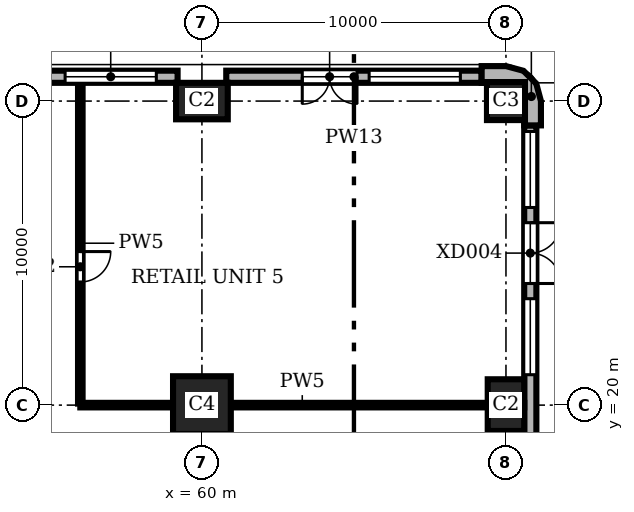
"""IFC4 building model, lengths in metres.
Left out: names, types, materials, properties, quantities, classifications, styles, units other than length and angle.
Written with IfcOpenShell. Run it as: python <this file> out.ifc"""

import sys

from ifc_helpers import new_model, si_unit, direction, frame, frame_2d, origin, origin_2d, place, context, subcontext, project, spatial, polyline, rectangle, outline, extrude, element, fill, save


model = new_model("IFC4")
c1 = context("Model", 3, precision=1e-05, world=origin(), true_north=direction((0.0, 1.0)))
c2 = subcontext(c1, "Body", "Model", "MODEL_VIEW")
j1 = project(units=[si_unit("LENGTHUNIT", "METRE"), si_unit("PLANEANGLEUNIT", "RADIAN")], contexts=[c1])
p1 = place(None, origin())
s1 = spatial("IfcSite", under=j1, at=p1, CompositionType="ELEMENT")
p2 = place(p1, origin())
s2 = spatial("IfcBuilding", under=s1, at=p2, CompositionType="ELEMENT")
p3 = place(p2, origin())
s3 = spatial("IfcBuildingStorey", under=s2, at=p3, CompositionType="ELEMENT", Elevation=0.0)
p4 = place(p3, frame((70.0, 20.0, 0.0), z_axis=(0.0, 0.0, 1.0), x_axis=(0.0, 1.0, 0.0)))
e1 = element("IfcColumn", 1, at=p4, inside=s3, PredefinedType="COLUMN", context=c2, shape_type="SweptSolid", body=[
    extrude(rectangle(XDim=1.7, YDim=1.2, at=origin_2d()), origin(), (0.0, 0.0, 1.0), 6.0),
])
p5 = place(p3, frame((70.0, 30.0, 0.0), z_axis=(0.0, 0.0, 1.0), x_axis=(1.0, 0.0, 0.0)))
e2 = element("IfcColumn", 2, at=p5, inside=s3, PredefinedType="COLUMN", context=c2, shape_type="SweptSolid", body=[
    extrude(rectangle(XDim=1.25, YDim=1.25, at=origin_2d()), origin(), (0.0, 0.0, 1.0), 6.0),
])
p6 = place(p3, frame((60.0, 30.0, 0.0), z_axis=(0.0, 0.0, 1.0), x_axis=(1.0, 0.0, 0.0)))
e3 = element("IfcColumn", 3, at=p6, inside=s3, PredefinedType="COLUMN", context=c2, shape_type="SweptSolid", body=[
    extrude(rectangle(XDim=1.7, YDim=1.2, at=origin_2d()), origin(), (0.0, 0.0, 1.0), 6.0),
])
p7 = place(p3, frame((60.0, 20.0, 0.0), z_axis=(0.0, 0.0, 1.0), x_axis=(1.0, 0.0, 0.0)))
e4 = element("IfcColumn", 4, at=p7, inside=s3, PredefinedType="COLUMN", context=c2, shape_type="SweptSolid", body=[
    extrude(rectangle(XDim=1.9, YDim=1.9, at=origin_2d()), origin(), (0.0, 0.0, 1.0), 6.0),
])
p8 = place(p3, origin())
e5 = element("IfcWall", 5, at=p8, inside=s3, PredefinedType="SOLIDWALL", context=c2, shape_type="SweptSolid", body=[
    extrude(outline(polyline([(71.0, 29.2), (71.15, 29.2), (71.15, 30.0), (70.996, 30.575), (70.575, 30.996), (70.0, 31.15), (69.2, 31.15), (69.2, 31.0), (69.2, 30.6), (70.0, 30.6), (70.3, 30.52), (70.52, 30.3), (70.6, 30.0), (70.6, 29.2), (71.0, 29.2)])), origin(), (0.0, 0.0, 1.0), 6.0),
])
p9 = place(p3, frame((70.8, 0.8, 0.0), z_axis=(0.0, 0.0, 1.0), x_axis=(0.0, 1.0, 0.0)))
e6 = element("IfcWall", 6, at=p9, inside=s3, PredefinedType="SOLIDWALL", context=c2, shape_type="SweptSolid", body=[
    extrude(rectangle(XDim=28.4, YDim=0.4, at=frame_2d((14.2, 0.0))), origin(), (0.0, 0.0, 1.0), 6.0),
])
p10 = place(p9, frame((0.2, 0.0, 0.3)))
e7 = element("IfcOpeningElement", 7, at=p10, cuts=e6, PredefinedType="OPENING", context=c2, shape_type="SweptSolid", body=[
    extrude(rectangle(XDim=2.5, YDim=4.2, at=frame_2d((1.25, 2.1))), frame((0.0, 0.21, 0.0), z_axis=(0.0, -1.0, 0.0), x_axis=(1.0, 0.0, 0.0)), (0.0, 0.0, 1.0), 0.42),
])
p11 = place(p9, frame((3.2, 0.0, 0.0)))
e8 = element("IfcOpeningElement", 8, at=p11, cuts=e6, PredefinedType="OPENING", context=c2, shape_type="SweptSolid", body=[
    extrude(rectangle(XDim=2.0, YDim=2.7, at=frame_2d((1.0, 1.35))), frame((0.0, 0.21, 0.0), z_axis=(0.0, -1.0, 0.0), x_axis=(1.0, 0.0, 0.0)), (0.0, 0.0, 1.0), 0.42),
])
p12 = place(p9, frame((5.7, 0.0, 0.3)))
e9 = element("IfcOpeningElement", 9, at=p12, cuts=e6, PredefinedType="OPENING", context=c2, shape_type="SweptSolid", body=[
    extrude(rectangle(XDim=2.5, YDim=4.2, at=frame_2d((1.25, 2.1))), frame((0.0, 0.21, 0.0), z_axis=(0.0, -1.0, 0.0), x_axis=(1.0, 0.0, 0.0)), (0.0, 0.0, 1.0), 0.42),
])
p13 = place(p9, frame((10.2, 0.0, 0.3)))
e10 = element("IfcOpeningElement", 10, at=p13, cuts=e6, PredefinedType="OPENING", context=c2, shape_type="SweptSolid", body=[
    extrude(rectangle(XDim=2.3, YDim=4.2, at=frame_2d((1.15, 2.1))), frame((0.0, 0.21, 0.0), z_axis=(0.0, -1.0, 0.0), x_axis=(1.0, 0.0, 0.0)), (0.0, 0.0, 1.0), 0.42),
])
p14 = place(p9, frame((13.0, 0.0, 0.0)))
e11 = element("IfcOpeningElement", 11, at=p14, cuts=e6, PredefinedType="OPENING", context=c2, shape_type="SweptSolid", body=[
    extrude(rectangle(XDim=2.4, YDim=2.7, at=frame_2d((1.2, 1.35))), frame((0.0, 0.21, 0.0), z_axis=(0.0, -1.0, 0.0), x_axis=(1.0, 0.0, 0.0)), (0.0, 0.0, 1.0), 0.42),
])
p15 = place(p9, frame((15.9, 0.0, 0.3)))
e12 = element("IfcOpeningElement", 12, at=p15, cuts=e6, PredefinedType="OPENING", context=c2, shape_type="SweptSolid", body=[
    extrude(rectangle(XDim=2.3, YDim=4.2, at=frame_2d((1.15, 2.1))), frame((0.0, 0.21, 0.0), z_axis=(0.0, -1.0, 0.0), x_axis=(1.0, 0.0, 0.0)), (0.0, 0.0, 1.0), 0.42),
])
p16 = place(p9, frame((20.2, 0.0, 0.3)))
e13 = element("IfcOpeningElement", 13, at=p16, cuts=e6, PredefinedType="OPENING", context=c2, shape_type="SweptSolid", body=[
    extrude(rectangle(XDim=2.5, YDim=4.2, at=frame_2d((1.25, 2.1))), frame((0.0, 0.21, 0.0), z_axis=(0.0, -1.0, 0.0), x_axis=(1.0, 0.0, 0.0)), (0.0, 0.0, 1.0), 0.42),
])
p17 = place(p9, frame((23.2, 0.0, 0.0)))
e14 = element("IfcOpeningElement", 14, at=p17, cuts=e6, PredefinedType="OPENING", context=c2, shape_type="SweptSolid", body=[
    extrude(rectangle(XDim=2.0, YDim=2.7, at=frame_2d((1.0, 1.35))), frame((0.0, 0.21, 0.0), z_axis=(0.0, -1.0, 0.0), x_axis=(1.0, 0.0, 0.0)), (0.0, 0.0, 1.0), 0.42),
])
p18 = place(p9, frame((25.7, 0.0, 0.3)))
e15 = element("IfcOpeningElement", 15, at=p18, cuts=e6, PredefinedType="OPENING", context=c2, shape_type="SweptSolid", body=[
    extrude(rectangle(XDim=2.5, YDim=4.2, at=frame_2d((1.25, 2.1))), frame((0.0, 0.21, 0.0), z_axis=(0.0, -1.0, 0.0), x_axis=(1.0, 0.0, 0.0)), (0.0, 0.0, 1.0), 0.42),
])
p19 = place(p3, frame((69.2, 30.8, 0.0), z_axis=(0.0, 0.0, 1.0), x_axis=(-1.0, 0.0, 0.0)))
e16 = element("IfcWall", 16, at=p19, inside=s3, PredefinedType="SOLIDWALL", context=c2, shape_type="SweptSolid", body=[
    extrude(rectangle(XDim=8.4, YDim=0.4, at=frame_2d((4.2, 0.0))), origin(), (0.0, 0.0, 1.0), 5.55),
])
p20 = place(p19, frame((0.7, 0.0, 0.3)))
e17 = element("IfcOpeningElement", 17, at=p20, cuts=e16, PredefinedType="OPENING", context=c2, shape_type="SweptSolid", body=[
    extrude(rectangle(XDim=3.0, YDim=2.6, at=frame_2d((1.5, 1.3))), frame((0.0, 0.21, 0.0), z_axis=(0.0, -1.0, 0.0), x_axis=(1.0, 0.0, 0.0)), (0.0, 0.0, 1.0), 0.42),
])
p21 = place(p19, frame((4.1, 0.0, 0.0)))
e18 = element("IfcOpeningElement", 18, at=p21, cuts=e16, PredefinedType="OPENING", context=c2, shape_type="SweptSolid", body=[
    extrude(rectangle(XDim=1.8, YDim=2.4, at=frame_2d((0.9, 1.2))), frame((0.0, 0.21, 0.0), z_axis=(0.0, -1.0, 0.0), x_axis=(1.0, 0.0, 0.0)), (0.0, 0.0, 1.0), 0.42),
])
p22 = place(p3, frame((59.2, 30.8, 0.0), z_axis=(0.0, 0.0, 1.0), x_axis=(-1.0, 0.0, 0.0)))
e19 = element("IfcWall", 19, at=p22, inside=s3, PredefinedType="SOLIDWALL", context=c2, shape_type="SweptSolid", body=[
    extrude(rectangle(XDim=8.4, YDim=0.4, at=frame_2d((4.2, 0.0))), origin(), (0.0, 0.0, 1.0), 5.55),
])
p23 = place(p22, frame((0.7, 0.0, 0.3)))
e20 = element("IfcOpeningElement", 20, at=p23, cuts=e19, PredefinedType="OPENING", context=c2, shape_type="SweptSolid", body=[
    extrude(rectangle(XDim=3.0, YDim=2.6, at=frame_2d((1.5, 1.3))), frame((0.0, 0.21, 0.0), z_axis=(0.0, -1.0, 0.0), x_axis=(1.0, 0.0, 0.0)), (0.0, 0.0, 1.0), 0.42),
])
p24 = place(p22, frame((4.7, 0.0, 0.3)))
e21 = element("IfcOpeningElement", 21, at=p24, cuts=e19, PredefinedType="OPENING", context=c2, shape_type="SweptSolid", body=[
    extrude(rectangle(XDim=3.0, YDim=2.6, at=frame_2d((1.5, 1.3))), frame((0.0, 0.21, 0.0), z_axis=(0.0, -1.0, 0.0), x_axis=(1.0, 0.0, 0.0)), (0.0, 0.0, 1.0), 0.42),
])
p25 = place(p3, frame((56.0, 20.05, 0.0), z_axis=(0.0, 0.0, 1.0), x_axis=(0.0, 1.0, 0.0)))
e22 = element("IfcWall", 22, at=p25, inside=s3, PredefinedType="PARTITIONING", context=c2, shape_type="SweptSolid", body=[
    extrude(rectangle(XDim=10.55, YDim=0.15, at=frame_2d((5.275, 0.0))), origin(), (0.0, 0.0, 1.0), 5.55),
])
p26 = place(p25, frame((4.0, 0.0, 0.0)))
e23 = element("IfcOpeningElement", 23, at=p26, cuts=e22, PredefinedType="OPENING", context=c2, shape_type="SweptSolid", body=[
    extrude(rectangle(XDim=1.0, YDim=2.1, at=frame_2d((0.5, 1.05))), frame((0.0, 0.085, 0.0), z_axis=(0.0, -1.0, 0.0), x_axis=(1.0, 0.0, 0.0)), (0.0, 0.0, 1.0), 0.17),
])
p27 = place(p3, frame((56.0, 20.0, 0.0), z_axis=(0.0, 0.0, 1.0), x_axis=(1.0, 0.0, 0.0)))
e24 = element("IfcWall", 24, at=p27, inside=s3, PredefinedType="PARTITIONING", context=c2, shape_type="SweptSolid", body=[
    extrude(rectangle(XDim=14.6, YDim=0.15, at=frame_2d((7.3, 0.0))), origin(), (0.0, 0.0, 1.0), 5.55),
])
p28 = place(p16, origin())
e25 = element("IfcWindow", 25, at=p28, inside=s3, PartitioningType="SINGLE_PANEL", PredefinedType="WINDOW", context=c2, shape_type="SweptSolid", body=[
    extrude(rectangle(XDim=2.5, YDim=4.2, at=frame_2d((1.25, 2.1))), frame((0.0, 0.16, 0.0), z_axis=(0.0, -1.0, 0.0), x_axis=(1.0, 0.0, 0.0)), (0.0, 0.0, 1.0), 0.06),
])
fill(e13, e25)
p29 = place(p17, frame((2.0, 0.0, 0.0), z_axis=(0.0, 0.0, 1.0), x_axis=(-1.0, 0.0, 0.0)))
e26 = element("IfcDoor", 26, at=p29, inside=s3, OperationType="DOUBLE_DOOR_DOUBLE_SWING", PredefinedType="DOOR", context=c2, shape_type="SweptSolid", body=[
    extrude(rectangle(XDim=2.0, YDim=2.7, at=frame_2d((1.0, 1.35))), frame((0.0, 0.025, 0.0), z_axis=(0.0, -1.0, 0.0), x_axis=(1.0, 0.0, 0.0)), (0.0, 0.0, 1.0), 0.05),
])
fill(e14, e26)
p30 = place(p18, origin())
e27 = element("IfcWindow", 27, at=p30, inside=s3, PartitioningType="SINGLE_PANEL", PredefinedType="WINDOW", context=c2, shape_type="SweptSolid", body=[
    extrude(rectangle(XDim=2.5, YDim=4.2, at=frame_2d((1.25, 2.1))), frame((0.0, 0.16, 0.0), z_axis=(0.0, -1.0, 0.0), x_axis=(1.0, 0.0, 0.0)), (0.0, 0.0, 1.0), 0.06),
])
fill(e15, e27)
p31 = place(p20, origin())
e28 = element("IfcWindow", 28, at=p31, inside=s3, PartitioningType="SINGLE_PANEL", PredefinedType="WINDOW", context=c2, shape_type="SweptSolid", body=[
    extrude(rectangle(XDim=3.0, YDim=2.6, at=frame_2d((1.5, 1.3))), frame((0.0, 0.03, 0.0), z_axis=(0.0, -1.0, 0.0), x_axis=(1.0, 0.0, 0.0)), (0.0, 0.0, 1.0), 0.06),
])
fill(e17, e28)
p32 = place(p21, origin())
e29 = element("IfcDoor", 29, at=p32, inside=s3, OperationType="DOUBLE_DOOR_SINGLE_SWING", PredefinedType="DOOR", context=c2, shape_type="SweptSolid", body=[
    extrude(rectangle(XDim=1.8, YDim=2.4, at=frame_2d((0.9, 1.2))), frame((0.0, 0.025, 0.0), z_axis=(0.0, -1.0, 0.0), x_axis=(1.0, 0.0, 0.0)), (0.0, 0.0, 1.0), 0.05),
])
fill(e18, e29)
p33 = place(p23, origin())
e30 = element("IfcWindow", 30, at=p33, inside=s3, PartitioningType="SINGLE_PANEL", PredefinedType="WINDOW", context=c2, shape_type="SweptSolid", body=[
    extrude(rectangle(XDim=3.0, YDim=2.6, at=frame_2d((1.5, 1.3))), frame((0.0, 0.03, 0.0), z_axis=(0.0, -1.0, 0.0), x_axis=(1.0, 0.0, 0.0)), (0.0, 0.0, 1.0), 0.06),
])
fill(e20, e30)
p34 = place(p26, frame((1.0, 0.0, 0.0), z_axis=(0.0, 0.0, 1.0), x_axis=(-1.0, 0.0, 0.0)))
e31 = element("IfcDoor", 31, at=p34, inside=s3, OperationType="SINGLE_SWING_LEFT", PredefinedType="DOOR", context=c2, shape_type="SweptSolid", body=[
    extrude(rectangle(XDim=1.0, YDim=2.1, at=frame_2d((0.5, 1.05))), frame((0.0, 0.025, 0.0), z_axis=(0.0, -1.0, 0.0), x_axis=(1.0, 0.0, 0.0)), (0.0, 0.0, 1.0), 0.05),
])
fill(e23, e31)
save(model, sys.argv[1])
